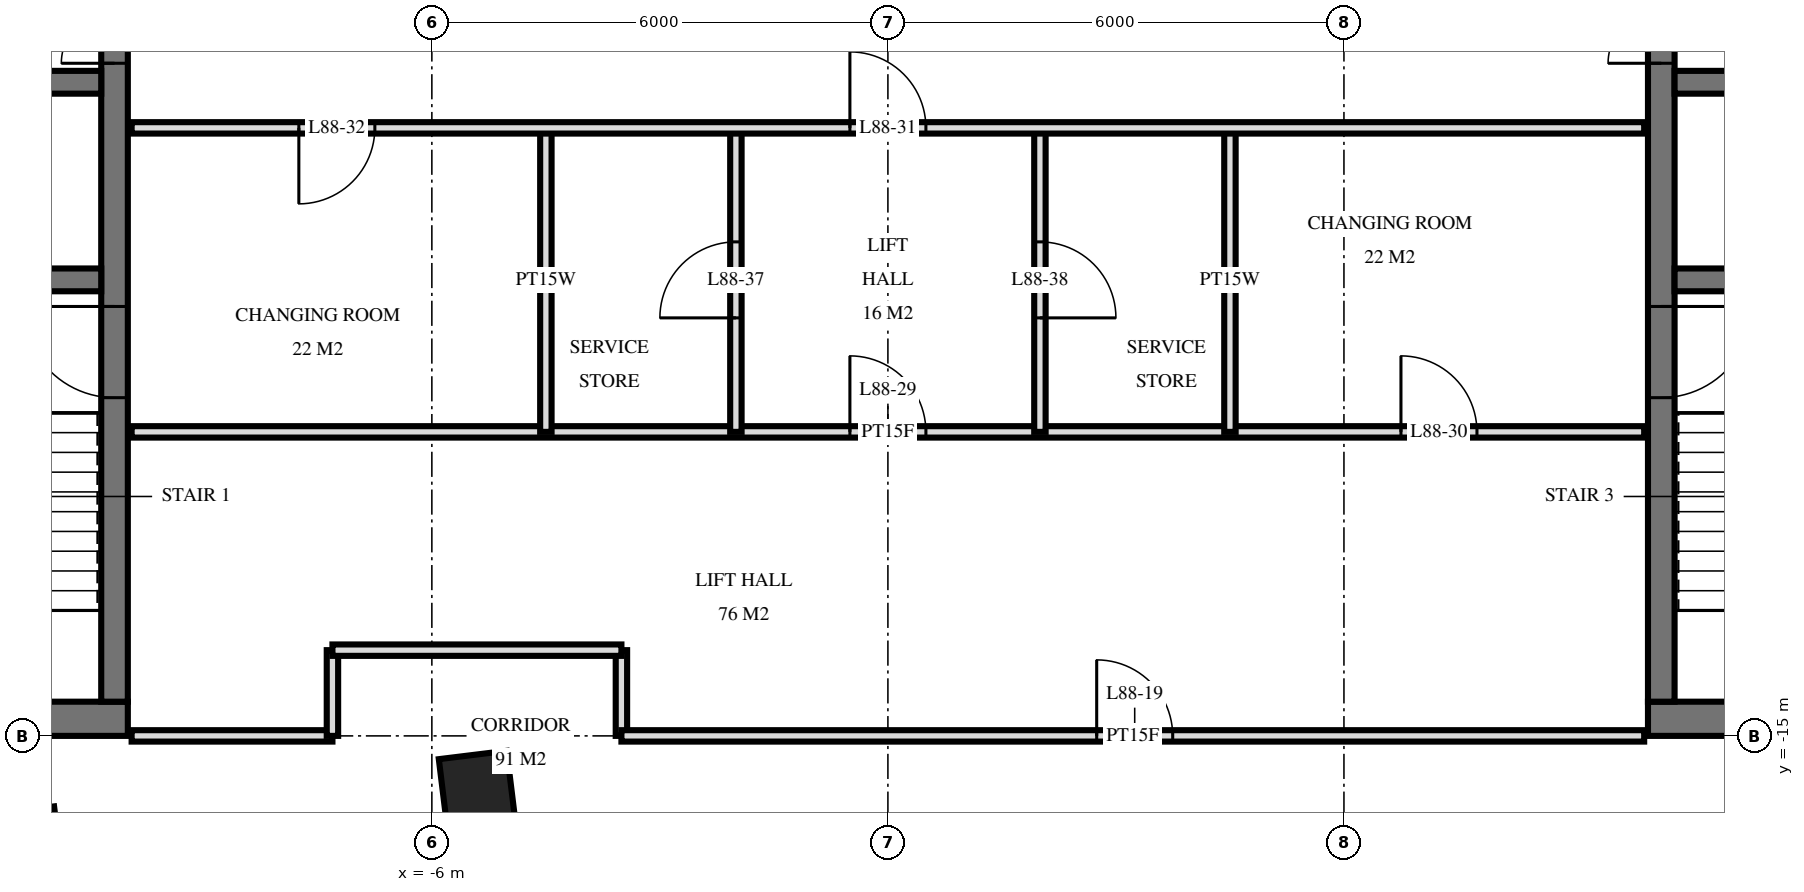
"""IFC4 building model, lengths in metres.
Left out: names, types, materials, properties, quantities, classifications, styles, units other than length and angle.
Written with IfcOpenShell. Run it as: python <this file> out.ifc"""

import sys

from ifc_helpers import new_model, si_unit, direction, frame, frame_2d, origin, origin_2d, place, context, subcontext, project, spatial, rectangle, extrude, element, fill, save


model = new_model("IFC4")
c1 = context("Model", 3, precision=1e-05, world=origin(), true_north=direction((0.0, 1.0)))
c2 = subcontext(c1, "Body", "Model", "MODEL_VIEW")
j1 = project(units=[si_unit("LENGTHUNIT", "METRE"), si_unit("PLANEANGLEUNIT", "RADIAN")], contexts=[c1])
p1 = place(None, origin())
s1 = spatial("IfcSite", under=j1, at=p1, CompositionType="ELEMENT")
p2 = place(p1, origin())
s2 = spatial("IfcBuilding", under=s1, at=p2, CompositionType="ELEMENT")
p3 = place(p2, frame((0.0, 0.0, 334.6)))
s3 = spatial("IfcBuildingStorey", under=s2, at=p3, CompositionType="ELEMENT", Elevation=334.6)
for number, where, z_axis, x_axis in (
    (1, (-11.362, -16.429, 0.0), (0.0, 0.0, 1.0), (0.993, 0.122, 0.0)),
    (2, (-5.407, -15.698, 0.0), (0.0, 0.0, 1.0), (0.993, 0.122, 0.0)),
):
    element("IfcColumn", number, at=place(p3, frame(where, z_axis=z_axis, x_axis=x_axis)), inside=s3, PredefinedType="COLUMN", context=c2, shape_type="SweptSolid", body=[
        extrude(rectangle(XDim=0.9, YDim=0.9, at=origin_2d()), origin(), (0.0, 0.0, 1.0), 4.0),
    ])
p4 = place(p3, frame((-19.5, -14.775, 0.0), z_axis=(0.0, 0.0, 1.0), x_axis=(1.0, 0.0, 0.0)))
e3 = element("IfcWall", 3, at=p4, inside=s3, PredefinedType="SHEAR", context=c2, shape_type="SweptSolid", body=[
    extrude(rectangle(XDim=9.5, YDim=0.45, at=frame_2d((4.75, 0.0))), origin(), (0.0, 0.0, 1.0), 4.0),
])
p5 = place(p4, frame((1.2, 0.0, 0.0)))
e4 = element("IfcOpeningElement", 4, at=p5, cuts=e3, PredefinedType="OPENING", context=c2, shape_type="SweptSolid", body=[
    extrude(rectangle(XDim=1.2, YDim=2.1, at=frame_2d((0.6, 1.05))), frame((0.0, 0.235, 0.0), z_axis=(0.0, -1.0, 0.0), x_axis=(1.0, 0.0, 0.0)), (0.0, 0.0, 1.0), 0.47),
])
p6 = place(p4, frame((4.25, 0.0, 0.0)))
e5 = element("IfcOpeningElement", 5, at=p6, cuts=e3, PredefinedType="OPENING", context=c2, shape_type="SweptSolid", body=[
    extrude(rectangle(XDim=1.1, YDim=2.1, at=frame_2d((0.55, 1.05))), frame((0.0, 0.235, 0.0), z_axis=(0.0, -1.0, 0.0), x_axis=(1.0, 0.0, 0.0)), (0.0, 0.0, 1.0), 0.47),
])
p7 = place(p3, frame((-10.175, -14.55, 0.0), z_axis=(0.0, 0.0, 1.0), x_axis=(0.0, 1.0, 0.0)))
e6 = element("IfcWall", 6, at=p7, inside=s3, PredefinedType="SHEAR", context=c2, shape_type="SweptSolid", body=[
    extrude(rectangle(XDim=14.1, YDim=0.35, at=frame_2d((7.05, 0.0))), origin(), (0.0, 0.0, 1.0), 4.0),
])
p8 = place(p7, frame((8.4, 0.0, 0.0)))
e7 = element("IfcOpeningElement", 7, at=p8, cuts=e6, PredefinedType="OPENING", context=c2, shape_type="SweptSolid", body=[
    extrude(rectangle(XDim=1.4, YDim=2.4, at=frame_2d((0.7, 1.2))), frame((0.0, 0.185, 0.0), z_axis=(0.0, -1.0, 0.0), x_axis=(1.0, 0.0, 0.0)), (0.0, 0.0, 1.0), 0.37),
])
p9 = place(p7, frame((10.0, 0.0, 0.0)))
e8 = element("IfcOpeningElement", 8, at=p9, cuts=e6, PredefinedType="OPENING", context=c2, shape_type="SweptSolid", body=[
    extrude(rectangle(XDim=1.4, YDim=2.4, at=frame_2d((0.7, 1.2))), frame((0.0, 0.185, 0.0), z_axis=(0.0, -1.0, 0.0), x_axis=(1.0, 0.0, 0.0)), (0.0, 0.0, 1.0), 0.37),
])
p10 = place(p7, frame((4.0, 0.0, 0.0)))
e9 = element("IfcOpeningElement", 9, at=p10, cuts=e6, PredefinedType="OPENING", context=c2, shape_type="SweptSolid", body=[
    extrude(rectangle(XDim=1.2, YDim=2.1, at=frame_2d((0.6, 1.05))), frame((0.0, 0.185, 0.0), z_axis=(0.0, -1.0, 0.0), x_axis=(1.0, 0.0, 0.0)), (0.0, 0.0, 1.0), 0.37),
])
p11 = place(p3, frame((-19.05, -6.4, 0.0), z_axis=(0.0, 0.0, 1.0), x_axis=(1.0, 0.0, 0.0)))
e10 = element("IfcWall", 10, at=p11, inside=s3, PredefinedType="SHEAR", context=c2, shape_type="SweptSolid", body=[
    extrude(rectangle(XDim=8.7, YDim=0.3, at=frame_2d((4.35, 0.0))), origin(), (0.0, 0.0, 1.0), 4.0),
])
p12 = place(p11, frame((0.8, 0.0, 0.0)))
e11 = element("IfcOpeningElement", 11, at=p12, cuts=e10, PredefinedType="OPENING", context=c2, shape_type="SweptSolid", body=[
    extrude(rectangle(XDim=1.1, YDim=2.1, at=frame_2d((0.55, 1.05))), frame((0.0, 0.16, 0.0), z_axis=(0.0, -1.0, 0.0), x_axis=(1.0, 0.0, 0.0)), (0.0, 0.0, 1.0), 0.32),
])
p13 = place(p3, frame((-19.05, -9.0, 0.0), z_axis=(0.0, 0.0, 1.0), x_axis=(1.0, 0.0, 0.0)))
e12 = element("IfcWall", 12, at=p13, inside=s3, PredefinedType="SHEAR", context=c2, shape_type="SweptSolid", body=[
    extrude(rectangle(XDim=8.7, YDim=0.3, at=frame_2d((4.35, 0.0))), origin(), (0.0, 0.0, 1.0), 4.0),
])
p14 = place(p13, frame((3.8, 0.0, 0.0)))
e13 = element("IfcOpeningElement", 13, at=p14, cuts=e12, PredefinedType="OPENING", context=c2, shape_type="SweptSolid", body=[
    extrude(rectangle(XDim=1.1, YDim=2.1, at=frame_2d((0.55, 1.05))), frame((0.0, 0.16, 0.0), z_axis=(0.0, -1.0, 0.0), x_axis=(1.0, 0.0, 0.0)), (0.0, 0.0, 1.0), 0.32),
])
p15 = place(p3, frame((10.0, -14.775, 0.0), z_axis=(0.0, 0.0, 1.0), x_axis=(1.0, 0.0, 0.0)))
e14 = element("IfcWall", 14, at=p15, inside=s3, PredefinedType="SHEAR", context=c2, shape_type="SweptSolid", body=[
    extrude(rectangle(XDim=9.5, YDim=0.45, at=frame_2d((4.75, 0.0))), origin(), (0.0, 0.0, 1.0), 4.0),
])
p16 = place(p15, frame((7.1, 0.0, 0.0)))
e15 = element("IfcOpeningElement", 15, at=p16, cuts=e14, PredefinedType="OPENING", context=c2, shape_type="SweptSolid", body=[
    extrude(rectangle(XDim=1.2, YDim=2.1, at=frame_2d((0.6, 1.05))), frame((0.0, 0.235, 0.0), z_axis=(0.0, -1.0, 0.0), x_axis=(1.0, 0.0, 0.0)), (0.0, 0.0, 1.0), 0.47),
])
p17 = place(p15, frame((4.15, 0.0, 0.0)))
e16 = element("IfcOpeningElement", 16, at=p17, cuts=e14, PredefinedType="OPENING", context=c2, shape_type="SweptSolid", body=[
    extrude(rectangle(XDim=1.1, YDim=2.1, at=frame_2d((0.55, 1.05))), frame((0.0, 0.235, 0.0), z_axis=(0.0, -1.0, 0.0), x_axis=(1.0, 0.0, 0.0)), (0.0, 0.0, 1.0), 0.47),
])
p18 = place(p3, frame((10.175, -14.55, 0.0), z_axis=(0.0, 0.0, 1.0), x_axis=(0.0, 1.0, 0.0)))
e17 = element("IfcWall", 17, at=p18, inside=s3, PredefinedType="SHEAR", context=c2, shape_type="SweptSolid", body=[
    extrude(rectangle(XDim=14.1, YDim=0.35, at=frame_2d((7.05, 0.0))), origin(), (0.0, 0.0, 1.0), 4.0),
])
p19 = place(p18, frame((8.4, 0.0, 0.0)))
e18 = element("IfcOpeningElement", 18, at=p19, cuts=e17, PredefinedType="OPENING", context=c2, shape_type="SweptSolid", body=[
    extrude(rectangle(XDim=1.4, YDim=2.4, at=frame_2d((0.7, 1.2))), frame((0.0, 0.185, 0.0), z_axis=(0.0, -1.0, 0.0), x_axis=(1.0, 0.0, 0.0)), (0.0, 0.0, 1.0), 0.37),
])
p20 = place(p18, frame((10.0, 0.0, 0.0)))
e19 = element("IfcOpeningElement", 19, at=p20, cuts=e17, PredefinedType="OPENING", context=c2, shape_type="SweptSolid", body=[
    extrude(rectangle(XDim=1.4, YDim=2.4, at=frame_2d((0.7, 1.2))), frame((0.0, 0.185, 0.0), z_axis=(0.0, -1.0, 0.0), x_axis=(1.0, 0.0, 0.0)), (0.0, 0.0, 1.0), 0.37),
])
p21 = place(p18, frame((4.0, 0.0, 0.0)))
e20 = element("IfcOpeningElement", 20, at=p21, cuts=e17, PredefinedType="OPENING", context=c2, shape_type="SweptSolid", body=[
    extrude(rectangle(XDim=1.2, YDim=2.1, at=frame_2d((0.6, 1.05))), frame((0.0, 0.185, 0.0), z_axis=(0.0, -1.0, 0.0), x_axis=(1.0, 0.0, 0.0)), (0.0, 0.0, 1.0), 0.37),
])
p22 = place(p3, frame((10.35, -6.4, 0.0), z_axis=(0.0, 0.0, 1.0), x_axis=(1.0, 0.0, 0.0)))
e21 = element("IfcWall", 21, at=p22, inside=s3, PredefinedType="SHEAR", context=c2, shape_type="SweptSolid", body=[
    extrude(rectangle(XDim=8.7, YDim=0.3, at=frame_2d((4.35, 0.0))), origin(), (0.0, 0.0, 1.0), 4.0),
])
p23 = place(p22, frame((6.8, 0.0, 0.0)))
e22 = element("IfcOpeningElement", 22, at=p23, cuts=e21, PredefinedType="OPENING", context=c2, shape_type="SweptSolid", body=[
    extrude(rectangle(XDim=1.1, YDim=2.1, at=frame_2d((0.55, 1.05))), frame((0.0, 0.16, 0.0), z_axis=(0.0, -1.0, 0.0), x_axis=(1.0, 0.0, 0.0)), (0.0, 0.0, 1.0), 0.32),
])
p24 = place(p3, frame((10.35, -9.0, 0.0), z_axis=(0.0, 0.0, 1.0), x_axis=(1.0, 0.0, 0.0)))
e23 = element("IfcWall", 23, at=p24, inside=s3, PredefinedType="SHEAR", context=c2, shape_type="SweptSolid", body=[
    extrude(rectangle(XDim=8.7, YDim=0.3, at=frame_2d((4.35, 0.0))), origin(), (0.0, 0.0, 1.0), 4.0),
])
p25 = place(p24, frame((3.8, 0.0, 0.0)))
e24 = element("IfcOpeningElement", 24, at=p25, cuts=e23, PredefinedType="OPENING", context=c2, shape_type="SweptSolid", body=[
    extrude(rectangle(XDim=1.1, YDim=2.1, at=frame_2d((0.55, 1.05))), frame((0.0, 0.16, 0.0), z_axis=(0.0, -1.0, 0.0), x_axis=(1.0, 0.0, 0.0)), (0.0, 0.0, 1.0), 0.32),
])
p26 = place(p3, frame((4.5, -11.0, 0.0), z_axis=(0.0, 0.0, 1.0), x_axis=(0.0, 1.0, 0.0)))
e25 = element("IfcWall", 25, at=p26, inside=s3, PredefinedType="PLUMBINGWALL", context=c2, shape_type="SweptSolid", body=[
    extrude(rectangle(XDim=4.0, YDim=0.15, at=frame_2d((2.0, 0.0))), origin(), (0.0, 0.0, 1.0), 3.72),
])
p27 = place(p3, frame((2.0, -11.0, 0.0), z_axis=(0.0, 0.0, 1.0), x_axis=(0.0, 1.0, 0.0)))
e26 = element("IfcWall", 26, at=p27, inside=s3, PredefinedType="PARTITIONING", context=c2, shape_type="SweptSolid", body=[
    extrude(rectangle(XDim=4.0, YDim=0.15, at=frame_2d((2.0, 0.0))), origin(), (0.0, 0.0, 1.0), 3.72),
])
p28 = place(p27, frame((1.5, 0.0, 0.0)))
e27 = element("IfcOpeningElement", 27, at=p28, cuts=e26, PredefinedType="OPENING", context=c2, shape_type="SweptSolid", body=[
    extrude(rectangle(XDim=1.0, YDim=2.1, at=frame_2d((0.5, 1.05))), frame((0.0, 0.085, 0.0), z_axis=(0.0, -1.0, 0.0), x_axis=(1.0, 0.0, 0.0)), (0.0, 0.0, 1.0), 0.17),
])
p29 = place(p3, frame((-2.0, -11.0, 0.0), z_axis=(0.0, 0.0, 1.0), x_axis=(0.0, 1.0, 0.0)))
e28 = element("IfcWall", 28, at=p29, inside=s3, PredefinedType="PARTITIONING", context=c2, shape_type="SweptSolid", body=[
    extrude(rectangle(XDim=4.0, YDim=0.15, at=frame_2d((2.0, 0.0))), origin(), (0.0, 0.0, 1.0), 3.72),
])
p30 = place(p29, frame((1.5, 0.0, 0.0)))
e29 = element("IfcOpeningElement", 29, at=p30, cuts=e28, PredefinedType="OPENING", context=c2, shape_type="SweptSolid", body=[
    extrude(rectangle(XDim=1.0, YDim=2.1, at=frame_2d((0.5, 1.05))), frame((0.0, 0.085, 0.0), z_axis=(0.0, -1.0, 0.0), x_axis=(1.0, 0.0, 0.0)), (0.0, 0.0, 1.0), 0.17),
])
p31 = place(p3, frame((-3.506, -15.0, 0.0), z_axis=(0.0, 0.0, 1.0), x_axis=(0.0, 1.0, 0.0)))
e30 = element("IfcWall", 30, at=p31, inside=s3, PredefinedType="PARTITIONING", context=c2, shape_type="SweptSolid", body=[
    extrude(rectangle(XDim=1.128, YDim=0.15, at=frame_2d((0.564, 0.0))), origin(), (0.0, 0.0, 1.0), 3.72),
])
p32 = place(p3, frame((-4.5, -11.0, 0.0), z_axis=(0.0, 0.0, 1.0), x_axis=(0.0, 1.0, 0.0)))
e31 = element("IfcWall", 31, at=p32, inside=s3, PredefinedType="PLUMBINGWALL", context=c2, shape_type="SweptSolid", body=[
    extrude(rectangle(XDim=4.0, YDim=0.15, at=frame_2d((2.0, 0.0))), origin(), (0.0, 0.0, 1.0), 3.72),
])
p33 = place(p3, frame((-7.308, -15.0, 0.0), z_axis=(0.0, 0.0, 1.0), x_axis=(0.0, 1.0, 0.0)))
e32 = element("IfcWall", 32, at=p33, inside=s3, PredefinedType="PARTITIONING", context=c2, shape_type="SweptSolid", body=[
    extrude(rectangle(XDim=1.128, YDim=0.15, at=frame_2d((0.564, 0.0))), origin(), (0.0, 0.0, 1.0), 3.72),
])
p34 = place(p3, frame((-9.95, -15.0, 0.0), z_axis=(0.0, 0.0, 1.0), x_axis=(1.0, 0.0, 0.0)))
e33 = element("IfcWall", 33, at=p34, inside=s3, PredefinedType="PARTITIONING", context=c2, shape_type="SweptSolid", body=[
    extrude(rectangle(XDim=2.642, YDim=0.15, at=frame_2d((1.321, 0.0))), origin(), (0.0, 0.0, 1.0), 3.084),
])
p35 = place(p3, frame((-3.506, -15.0, 0.0), z_axis=(0.0, 0.0, 1.0), x_axis=(1.0, 0.0, 0.0)))
e34 = element("IfcWall", 34, at=p35, inside=s3, PredefinedType="PARTITIONING", context=c2, shape_type="SweptSolid", body=[
    extrude(rectangle(XDim=13.456, YDim=0.15, at=frame_2d((6.728, 0.0))), origin(), (0.0, 0.0, 1.0), 3.084),
])
p36 = place(p35, frame((6.253, 0.0, 0.0)))
e35 = element("IfcOpeningElement", 35, at=p36, cuts=e34, PredefinedType="OPENING", context=c2, shape_type="SweptSolid", body=[
    extrude(rectangle(XDim=1.0, YDim=2.1, at=frame_2d((0.5, 1.05))), frame((0.0, 0.085, 0.0), z_axis=(0.0, -1.0, 0.0), x_axis=(1.0, 0.0, 0.0)), (0.0, 0.0, 1.0), 0.17),
])
p37 = place(p3, frame((-7.308, -13.872, 0.0), z_axis=(0.0, 0.0, 1.0), x_axis=(1.0, 0.0, 0.0)))
e36 = element("IfcWall", 36, at=p37, inside=s3, PredefinedType="PARTITIONING", context=c2, shape_type="SweptSolid", body=[
    extrude(rectangle(XDim=3.802, YDim=0.15, at=frame_2d((1.901, 0.0))), origin(), (0.0, 0.0, 1.0), 3.72),
])
p38 = place(p3, frame((-9.95, -11.0, 0.0), z_axis=(0.0, 0.0, 1.0), x_axis=(1.0, 0.0, 0.0)))
e37 = element("IfcWall", 37, at=p38, inside=s3, PredefinedType="PARTITIONING", context=c2, shape_type="SweptSolid", body=[
    extrude(rectangle(XDim=19.9, YDim=0.15, at=frame_2d((9.95, 0.0))), origin(), (0.0, 0.0, 1.0), 3.72),
])
p39 = place(p38, frame((9.45, 0.0, 0.0)))
e38 = element("IfcOpeningElement", 38, at=p39, cuts=e37, PredefinedType="OPENING", context=c2, shape_type="SweptSolid", body=[
    extrude(rectangle(XDim=1.0, YDim=2.1, at=frame_2d((0.5, 1.05))), frame((0.0, 0.085, 0.0), z_axis=(0.0, -1.0, 0.0), x_axis=(1.0, 0.0, 0.0)), (0.0, 0.0, 1.0), 0.17),
])
p40 = place(p38, frame((16.7, 0.0, 0.0)))
e39 = element("IfcOpeningElement", 39, at=p40, cuts=e37, PredefinedType="OPENING", context=c2, shape_type="SweptSolid", body=[
    extrude(rectangle(XDim=1.0, YDim=2.1, at=frame_2d((0.5, 1.05))), frame((0.0, 0.085, 0.0), z_axis=(0.0, -1.0, 0.0), x_axis=(1.0, 0.0, 0.0)), (0.0, 0.0, 1.0), 0.17),
])
p41 = place(p3, frame((-9.95, -7.0, 0.0), z_axis=(0.0, 0.0, 1.0), x_axis=(1.0, 0.0, 0.0)))
e40 = element("IfcWall", 40, at=p41, inside=s3, PredefinedType="PARTITIONING", context=c2, shape_type="SweptSolid", body=[
    extrude(rectangle(XDim=19.9, YDim=0.15, at=frame_2d((9.95, 0.0))), origin(), (0.0, 0.0, 1.0), 3.72),
])
p42 = place(p41, frame((9.45, 0.0, 0.0)))
e41 = element("IfcOpeningElement", 41, at=p42, cuts=e40, PredefinedType="OPENING", context=c2, shape_type="SweptSolid", body=[
    extrude(rectangle(XDim=1.0, YDim=2.1, at=frame_2d((0.5, 1.05))), frame((0.0, 0.085, 0.0), z_axis=(0.0, -1.0, 0.0), x_axis=(1.0, 0.0, 0.0)), (0.0, 0.0, 1.0), 0.17),
])
p43 = place(p41, frame((2.2, 0.0, 0.0)))
e42 = element("IfcOpeningElement", 42, at=p43, cuts=e40, PredefinedType="OPENING", context=c2, shape_type="SweptSolid", body=[
    extrude(rectangle(XDim=1.0, YDim=2.1, at=frame_2d((0.5, 1.05))), frame((0.0, 0.085, 0.0), z_axis=(0.0, -1.0, 0.0), x_axis=(1.0, 0.0, 0.0)), (0.0, 0.0, 1.0), 0.17),
])
p44 = place(p8, origin())
e43 = element("IfcDoor", 43, at=p44, inside=s3, OperationType="DOUBLE_DOOR_SINGLE_SWING", PredefinedType="DOOR", context=c2, shape_type="SweptSolid", body=[
    extrude(rectangle(XDim=1.4, YDim=2.4, at=frame_2d((0.7, 1.2))), frame((0.0, 0.025, 0.0), z_axis=(0.0, -1.0, 0.0), x_axis=(1.0, 0.0, 0.0)), (0.0, 0.0, 1.0), 0.05),
])
fill(e7, e43)
p45 = place(p10, origin())
e44 = element("IfcDoor", 44, at=p45, inside=s3, OperationType="SINGLE_SWING_LEFT", PredefinedType="DOOR", context=c2, shape_type="SweptSolid", body=[
    extrude(rectangle(XDim=1.2, YDim=2.1, at=frame_2d((0.6, 1.05))), frame((0.0, 0.025, 0.0), z_axis=(0.0, -1.0, 0.0), x_axis=(1.0, 0.0, 0.0)), (0.0, 0.0, 1.0), 0.05),
])
fill(e9, e44)
p46 = place(p19, origin())
e45 = element("IfcDoor", 45, at=p46, inside=s3, OperationType="DOUBLE_DOOR_SINGLE_SWING", PredefinedType="DOOR", context=c2, shape_type="SweptSolid", body=[
    extrude(rectangle(XDim=1.4, YDim=2.4, at=frame_2d((0.7, 1.2))), frame((0.0, 0.025, 0.0), z_axis=(0.0, -1.0, 0.0), x_axis=(1.0, 0.0, 0.0)), (0.0, 0.0, 1.0), 0.05),
])
fill(e18, e45)
p47 = place(p21, frame((0.6, 0.0, 0.0), z_axis=(0.0, 0.0, 1.0), x_axis=(-1.0, 0.0, 0.0)))
e46 = element("IfcDoor", 46, at=p47, inside=s3, OperationType="SINGLE_SWING_RIGHT", PredefinedType="DOOR", context=c2, shape_type="SweptSolid", body=[
    extrude(rectangle(XDim=1.2, YDim=2.1, at=frame_2d((0.0, 1.05))), frame((0.0, -0.025, 0.0), z_axis=(0.0, 1.0, 0.0), x_axis=(-1.0, 0.0, 0.0)), (0.0, 0.0, 1.0), 0.05),
])
fill(e20, e46)
p48 = place(p36, origin())
e47 = element("IfcDoor", 47, at=p48, inside=s3, OperationType="SINGLE_SWING_RIGHT", PredefinedType="DOOR", context=c2, shape_type="SweptSolid", body=[
    extrude(rectangle(XDim=1.0, YDim=2.1, at=frame_2d((0.5, 1.05))), frame((0.0, 0.025, 0.0), z_axis=(0.0, -1.0, 0.0), x_axis=(1.0, 0.0, 0.0)), (0.0, 0.0, 1.0), 0.05),
])
fill(e35, e47)
p49 = place(p39, origin())
e48 = element("IfcDoor", 48, at=p49, inside=s3, OperationType="SINGLE_SWING_RIGHT", PredefinedType="DOOR", context=c2, shape_type="SweptSolid", body=[
    extrude(rectangle(XDim=1.0, YDim=2.1, at=frame_2d((0.5, 1.05))), frame((0.0, 0.025, 0.0), z_axis=(0.0, -1.0, 0.0), x_axis=(1.0, 0.0, 0.0)), (0.0, 0.0, 1.0), 0.05),
])
fill(e38, e48)
p50 = place(p40, origin())
e49 = element("IfcDoor", 49, at=p50, inside=s3, OperationType="SINGLE_SWING_RIGHT", PredefinedType="DOOR", context=c2, shape_type="SweptSolid", body=[
    extrude(rectangle(XDim=1.0, YDim=2.1, at=frame_2d((0.5, 1.05))), frame((0.0, 0.025, 0.0), z_axis=(0.0, -1.0, 0.0), x_axis=(1.0, 0.0, 0.0)), (0.0, 0.0, 1.0), 0.05),
])
fill(e39, e49)
p51 = place(p42, origin())
e50 = element("IfcDoor", 50, at=p51, inside=s3, OperationType="SINGLE_SWING_RIGHT", PredefinedType="DOOR", context=c2, shape_type="SweptSolid", body=[
    extrude(rectangle(XDim=1.0, YDim=2.1, at=frame_2d((0.5, 1.05))), frame((0.0, 0.025, 0.0), z_axis=(0.0, -1.0, 0.0), x_axis=(1.0, 0.0, 0.0)), (0.0, 0.0, 1.0), 0.05),
])
fill(e41, e50)
p52 = place(p43, frame((0.5, 0.0, 0.0), z_axis=(0.0, 0.0, 1.0), x_axis=(-1.0, 0.0, 0.0)))
e51 = element("IfcDoor", 51, at=p52, inside=s3, OperationType="SINGLE_SWING_LEFT", PredefinedType="DOOR", context=c2, shape_type="SweptSolid", body=[
    extrude(rectangle(XDim=1.0, YDim=2.1, at=frame_2d((0.0, 1.05))), frame((0.0, -0.025, 0.0), z_axis=(0.0, 1.0, 0.0), x_axis=(-1.0, 0.0, 0.0)), (0.0, 0.0, 1.0), 0.05),
])
fill(e42, e51)
p53 = place(p30, origin())
e52 = element("IfcDoor", 52, at=p53, inside=s3, OperationType="SINGLE_SWING_RIGHT", PredefinedType="DOOR", context=c2, shape_type="SweptSolid", body=[
    extrude(rectangle(XDim=1.0, YDim=2.1, at=frame_2d((0.5, 1.05))), frame((0.0, 0.025, 0.0), z_axis=(0.0, -1.0, 0.0), x_axis=(1.0, 0.0, 0.0)), (0.0, 0.0, 1.0), 0.05),
])
fill(e29, e52)
p54 = place(p28, frame((0.5, 0.0, 0.0), z_axis=(0.0, 0.0, 1.0), x_axis=(-1.0, 0.0, 0.0)))
e53 = element("IfcDoor", 53, at=p54, inside=s3, OperationType="SINGLE_SWING_LEFT", PredefinedType="DOOR", context=c2, shape_type="SweptSolid", body=[
    extrude(rectangle(XDim=1.0, YDim=2.1, at=frame_2d((0.0, 1.05))), frame((0.0, -0.025, 0.0), z_axis=(0.0, 1.0, 0.0), x_axis=(-1.0, 0.0, 0.0)), (0.0, 0.0, 1.0), 0.05),
])
fill(e27, e53)
save(model, sys.argv[1])
